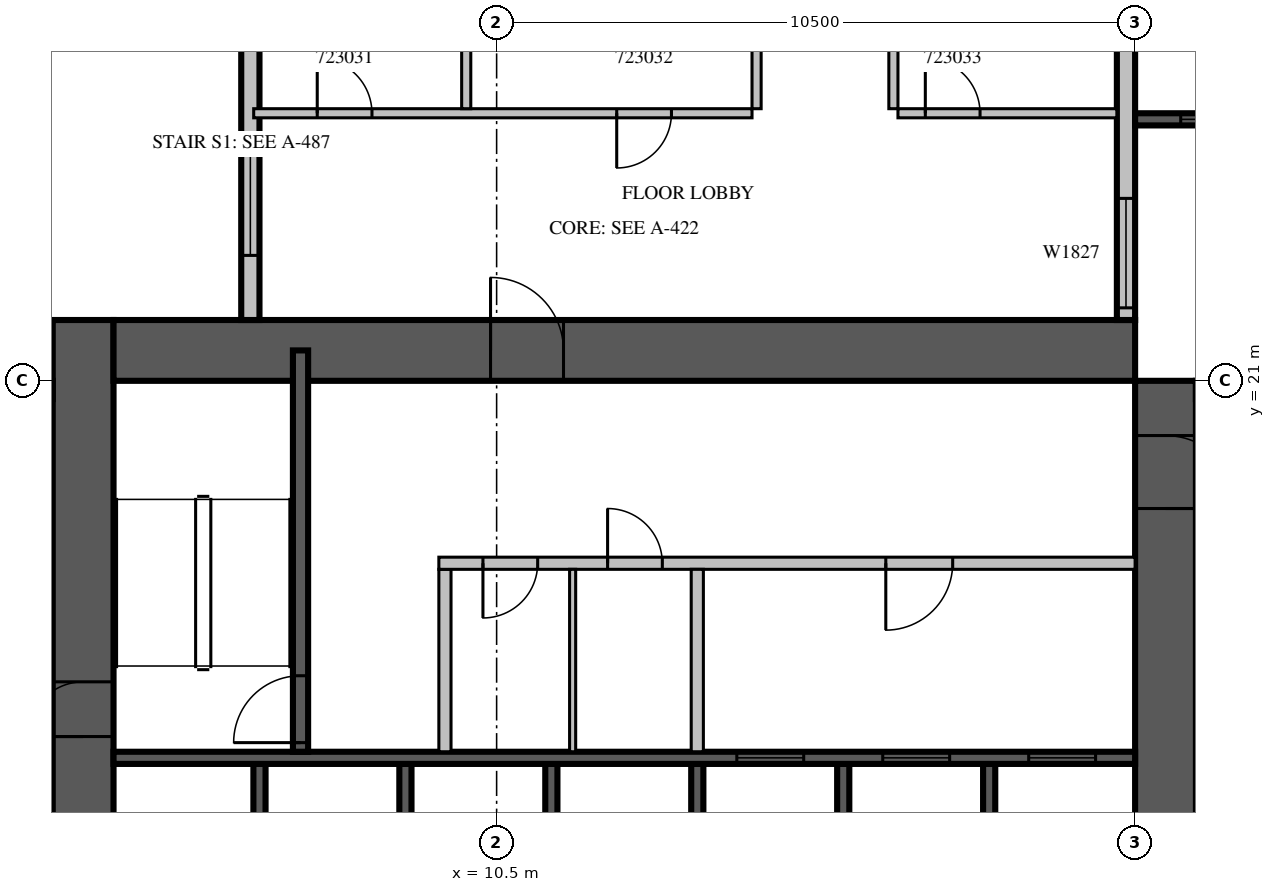
"""IFC4 building model, lengths in metres.
Left out: names, types, materials, properties, quantities, classifications, styles, units other than length and angle.
Written with IfcOpenShell. Run it as: python <this file> out.ifc"""

import sys

from ifc_helpers import new_model, si_unit, direction, frame, frame_2d, origin, place, context, subcontext, project, spatial, rectangle, extrude, source, transform, mapped, element, fill, save


model = new_model("IFC4")
c1 = context("Model", 3, precision=1e-05, world=origin(), true_north=direction((0.0, 1.0)))
c2 = subcontext(c1, "Body", "Model", "MODEL_VIEW")
j1 = project(units=[si_unit("LENGTHUNIT", "METRE"), si_unit("PLANEANGLEUNIT", "RADIAN")], contexts=[c1])
p1 = place(None, origin())
s1 = spatial("IfcSite", under=j1, at=p1, CompositionType="ELEMENT")
p2 = place(p1, origin())
s2 = spatial("IfcBuilding", under=s1, at=p2, CompositionType="ELEMENT")
p3 = place(p2, frame((0.0, 0.0, 107.7)))
s3 = spatial("IfcBuildingStorey", under=s2, at=p3, CompositionType="ELEMENT", Elevation=107.7)
m1 = source(origin(), c2, "Body", "SweptSolid", [
    extrude(rectangle(XDim=17.8, YDim=1.0, at=frame_2d((8.9, 0.0))), origin(), (0.0, 0.0, 1.0), 4.2),
])
p4 = place(p3, frame((3.7, 4.2, 0.0), z_axis=(0.0, 0.0, 1.0), x_axis=(0.0, 1.0, 0.0)))
e1 = element("IfcWall", 1, at=p4, inside=s3, PredefinedType="SHEAR", context=c2, shape_type="MappedRepresentation", body=[
    mapped(m1, transform((0.0, 0.0, 0.0), scale=1.0)),
])
m2 = source(origin(), c2, "Body", "SweptSolid", [
    extrude(rectangle(XDim=2.2, YDim=2.1, at=frame_2d((1.1, 1.05))), frame((0.0, 0.51, 0.0), z_axis=(0.0, -1.0, 0.0), x_axis=(1.0, 0.0, 0.0)), (0.0, 0.0, 1.0), 1.02),
])
p5 = place(p4, frame((4.2, 0.0, 0.0)))
e2 = element("IfcOpeningElement", 2, at=p5, cuts=e1, PredefinedType="OPENING", context=c2, shape_type="MappedRepresentation", body=[
    mapped(m2, transform((0.0, 0.0, 0.0), scale=1.0)),
])
m3 = source(origin(), c2, "Body", "SweptSolid", [
    extrude(rectangle(XDim=0.9, YDim=2.1, at=frame_2d((0.45, 1.05))), frame((0.0, 0.51, 0.0), z_axis=(0.0, -1.0, 0.0), x_axis=(1.0, 0.0, 0.0)), (0.0, 0.0, 1.0), 1.02),
])
p6 = place(p4, frame((10.95, 0.0, 0.0)))
e3 = element("IfcOpeningElement", 3, at=p6, cuts=e1, PredefinedType="OPENING", context=c2, shape_type="MappedRepresentation", body=[
    mapped(m3, transform((0.0, 0.0, 0.0), scale=1.0)),
])
m4 = source(origin(), c2, "Body", "SweptSolid", [
    extrude(rectangle(XDim=16.8, YDim=1.0, at=frame_2d((8.4, 0.0))), origin(), (0.0, 0.0, 1.0), 4.2),
])
p7 = place(p3, frame((21.5, 4.2, 0.0), z_axis=(0.0, 0.0, 1.0), x_axis=(0.0, 1.0, 0.0)))
e4 = element("IfcWall", 4, at=p7, inside=s3, PredefinedType="SHEAR", context=c2, shape_type="MappedRepresentation", body=[
    mapped(m4, transform((0.0, 0.0, 0.0), scale=1.0)),
])
p8 = place(p7, frame((4.2, 0.0, 0.0)))
e5 = element("IfcOpeningElement", 5, at=p8, cuts=e4, PredefinedType="OPENING", context=c2, shape_type="MappedRepresentation", body=[
    mapped(m2, transform((0.0, 0.0, 0.0), scale=1.0)),
])
m5 = source(origin(), c2, "Body", "SweptSolid", [
    extrude(rectangle(XDim=1.2, YDim=2.1, at=frame_2d((0.6, 1.05))), frame((0.0, 0.51, 0.0), z_axis=(0.0, -1.0, 0.0), x_axis=(1.0, 0.0, 0.0)), (0.0, 0.0, 1.0), 1.02),
])
p9 = place(p7, frame((14.7, 0.0, 0.0)))
e6 = element("IfcOpeningElement", 6, at=p9, cuts=e4, PredefinedType="OPENING", context=c2, shape_type="MappedRepresentation", body=[
    mapped(m5, transform((0.0, 0.0, 0.0), scale=1.0)),
])
p10 = place(p3, frame((4.2, 21.5, 0.0), z_axis=(0.0, 0.0, 1.0), x_axis=(1.0, 0.0, 0.0)))
e7 = element("IfcWall", 7, at=p10, inside=s3, PredefinedType="SHEAR", context=c2, shape_type="MappedRepresentation", body=[
    mapped(m4, transform((0.0, 0.0, 0.0), scale=1.0)),
])
p11 = place(p10, frame((6.2, 0.0, 0.0)))
e8 = element("IfcOpeningElement", 8, at=p11, cuts=e7, PredefinedType="OPENING", context=c2, shape_type="MappedRepresentation", body=[
    mapped(m5, transform((0.0, 0.0, 0.0), scale=1.0)),
])
m6 = source(origin(), c2, "Body", "SweptSolid", [
    extrude(rectangle(XDim=6.875, YDim=0.3, at=frame_2d((3.438, 0.0))), origin(), (0.0, 0.0, 1.0), 3.8),
])
p12 = place(p3, frame((20.85, 22.0, 0.0), z_axis=(0.0, 0.0, 1.0), x_axis=(0.0, 1.0, 0.0)))
e9 = element("IfcWall", 9, at=p12, inside=s3, PredefinedType="STANDARD", context=c2, shape_type="MappedRepresentation", body=[
    mapped(m6, transform((0.0, 0.0, 0.0), scale=1.0)),
])
m7 = source(origin(), c2, "Body", "SweptSolid", [
    extrude(rectangle(XDim=1.8, YDim=2.7, at=frame_2d((0.9, 1.35))), frame((0.0, 0.16, 0.0), z_axis=(0.0, -1.0, 0.0), x_axis=(1.0, 0.0, 0.0)), (0.0, 0.0, 1.0), 0.32),
])
p13 = place(p12, frame((0.2, 0.0, 0.6)))
e10 = element("IfcOpeningElement", 10, at=p13, cuts=e9, PredefinedType="OPENING", context=c2, shape_type="MappedRepresentation", body=[
    mapped(m7, transform((0.0, 0.0, 0.0), scale=1.0)),
])
m8 = source(origin(), c2, "Body", "SweptSolid", [
    extrude(rectangle(XDim=1.0, YDim=2.1, at=frame_2d((0.5, 1.05))), frame((0.0, 0.16, 0.0), z_axis=(0.0, -1.0, 0.0), x_axis=(1.0, 0.0, 0.0)), (0.0, 0.0, 1.0), 0.32),
])
p14 = place(p12, frame((4.8, 0.0, 0.0)))
e11 = element("IfcOpeningElement", 11, at=p14, cuts=e9, PredefinedType="OPENING", context=c2, shape_type="MappedRepresentation", body=[
    mapped(m8, transform((0.0, 0.0, 0.0), scale=1.0)),
])
p15 = place(p3, frame((6.45, 38.4, 0.0), z_axis=(0.0, 0.0, 1.0), x_axis=(0.0, -1.0, 0.0)))
e12 = element("IfcWall", 12, at=p15, inside=s3, PredefinedType="STANDARD", context=c2, shape_type="SweptSolid", body=[
    extrude(rectangle(XDim=16.4, YDim=0.3, at=frame_2d((8.2, 0.0))), origin(), (0.0, 0.0, 1.0), 3.8),
])
p16 = place(p15, frame((1.15, 0.0, 0.6)))
e13 = element("IfcOpeningElement", 13, at=p16, cuts=e12, PredefinedType="OPENING", context=c2, shape_type="MappedRepresentation", body=[
    mapped(m7, transform((0.0, 0.0, 0.0), scale=1.0)),
])
p17 = place(p15, frame((9.438, 0.0, 0.6)))
e14 = element("IfcOpeningElement", 14, at=p17, cuts=e12, PredefinedType="OPENING", context=c2, shape_type="MappedRepresentation", body=[
    mapped(m7, transform((0.0, 0.0, 0.0), scale=1.0)),
])
p18 = place(p15, frame((13.537, 0.0, 0.6)))
e15 = element("IfcOpeningElement", 15, at=p18, cuts=e12, PredefinedType="OPENING", context=c2, shape_type="MappedRepresentation", body=[
    mapped(m7, transform((0.0, 0.0, 0.0), scale=1.0)),
])
p19 = place(p15, frame((5.908, 0.0, 0.0)))
e16 = element("IfcOpeningElement", 16, at=p19, cuts=e12, PredefinedType="OPENING", context=c2, shape_type="MappedRepresentation", body=[
    mapped(m8, transform((0.0, 0.0, 0.0), scale=1.0)),
])
m9 = source(origin(), c2, "Body", "SweptSolid", [
    extrude(rectangle(XDim=3.9, YDim=0.2, at=frame_2d((1.95, 0.0))), origin(), (0.0, 0.0, 1.0), 3.79),
])
p20 = place(p3, frame((21.0, 25.3, 0.0), z_axis=(0.0, 0.0, 1.0), x_axis=(1.0, 0.0, 0.0)))
e17 = element("IfcWall", 17, at=p20, inside=s3, PredefinedType="SOLIDWALL", context=c2, shape_type="MappedRepresentation", body=[
    mapped(m9, transform((0.0, 0.0, 0.0), scale=1.0)),
])
m10 = source(origin(), c2, "Body", "SweptSolid", [
    extrude(rectangle(XDim=2.4, YDim=2.7, at=frame_2d((1.2, 1.35))), frame((0.0, 0.11, 0.0), z_axis=(0.0, -1.0, 0.0), x_axis=(1.0, 0.0, 0.0)), (0.0, 0.0, 1.0), 0.22),
])
p21 = place(p20, frame((0.75, 0.0, 0.6)))
e18 = element("IfcOpeningElement", 18, at=p21, cuts=e17, PredefinedType="OPENING", context=c2, shape_type="MappedRepresentation", body=[
    mapped(m10, transform((0.0, 0.0, 0.0), scale=1.0)),
])
m11 = source(origin(), c2, "Body", "SweptSolid", [
    extrude(rectangle(XDim=3.0, YDim=0.2, at=frame_2d((1.5, 0.0))), origin(), (0.0, 0.0, 1.0), 4.2),
])
for number, where, z_axis, x_axis in (
    (19, (6.6, 11.7, 0.0), (0.0, 0.0, 1.0), (0.0, 1.0, 0.0)),
    (20, (9.0, 11.7, 0.0), (0.0, 0.0, 1.0), (0.0, 1.0, 0.0)),
    (21, (11.4, 11.7, 0.0), (0.0, 0.0, 1.0), (0.0, 1.0, 0.0)),
    (22, (13.8, 11.7, 0.0), (0.0, 0.0, 1.0), (0.0, 1.0, 0.0)),
    (23, (16.2, 11.7, 0.0), (0.0, 0.0, 1.0), (0.0, 1.0, 0.0)),
    (24, (18.6, 11.7, 0.0), (0.0, 0.0, 1.0), (0.0, 1.0, 0.0)),
):
    element("IfcWall", number, at=place(p3, frame(where, z_axis=z_axis, x_axis=x_axis)), inside=s3, PredefinedType="SOLIDWALL", context=c2, shape_type="MappedRepresentation", body=[
        mapped(m11, transform((0.0, 0.0, 0.0), scale=1.0)),
    ])
m12 = source(origin(), c2, "Body", "SweptSolid", [
    extrude(rectangle(XDim=16.8, YDim=0.2, at=frame_2d((8.4, 0.0))), origin(), (0.0, 0.0, 1.0), 4.2),
])
p22 = place(p3, frame((4.2, 14.8, 0.0), z_axis=(0.0, 0.0, 1.0), x_axis=(1.0, 0.0, 0.0)))
e25 = element("IfcWall", 25, at=p22, inside=s3, PredefinedType="SOLIDWALL", context=c2, shape_type="MappedRepresentation", body=[
    mapped(m12, transform((0.0, 0.0, 0.0), scale=1.0)),
])
m13 = source(origin(), c2, "Body", "SweptSolid", [
    extrude(rectangle(XDim=1.1, YDim=2.1, at=frame_2d((0.55, 1.05))), frame((0.0, 0.11, 0.0), z_axis=(0.0, -1.0, 0.0), x_axis=(1.0, 0.0, 0.0)), (0.0, 0.0, 1.0), 0.22),
])
p23 = place(p22, frame((10.25, 0.0, 0.0)))
e26 = element("IfcOpeningElement", 26, at=p23, cuts=e25, PredefinedType="OPENING", context=c2, shape_type="MappedRepresentation", body=[
    mapped(m13, transform((0.0, 0.0, 0.0), scale=1.0)),
])
p24 = place(p22, frame((12.65, 0.0, 0.0)))
e27 = element("IfcOpeningElement", 27, at=p24, cuts=e25, PredefinedType="OPENING", context=c2, shape_type="MappedRepresentation", body=[
    mapped(m13, transform((0.0, 0.0, 0.0), scale=1.0)),
])
p25 = place(p22, frame((15.05, 0.0, 0.0)))
e28 = element("IfcOpeningElement", 28, at=p25, cuts=e25, PredefinedType="OPENING", context=c2, shape_type="MappedRepresentation", body=[
    mapped(m13, transform((0.0, 0.0, 0.0), scale=1.0)),
])
m14 = source(origin(), c2, "Body", "SweptSolid", [
    extrude(rectangle(XDim=6.6, YDim=0.25, at=frame_2d((3.3, 0.0))), origin(), (0.0, 0.0, 1.0), 3.8),
])
p26 = place(p3, frame((7.275, 14.9, 0.0), z_axis=(0.0, 0.0, 1.0), x_axis=(0.0, 1.0, 0.0)))
e29 = element("IfcWall", 29, at=p26, inside=s3, PredefinedType="SOLIDWALL", context=c2, shape_type="MappedRepresentation", body=[
    mapped(m14, transform((0.0, 0.0, 0.0), scale=1.0)),
])
m15 = source(origin(), c2, "Body", "SweptSolid", [
    extrude(rectangle(XDim=1.1, YDim=2.1, at=frame_2d((0.55, 1.05))), frame((0.0, 0.135, 0.0), z_axis=(0.0, -1.0, 0.0), x_axis=(1.0, 0.0, 0.0)), (0.0, 0.0, 1.0), 0.27),
])
p27 = place(p26, frame((0.15, 0.0, 0.0)))
e30 = element("IfcOpeningElement", 30, at=p27, cuts=e29, PredefinedType="OPENING", context=c2, shape_type="MappedRepresentation", body=[
    mapped(m15, transform((0.0, 0.0, 0.0), scale=1.0)),
])
m16 = source(origin(), c2, "Body", "SweptSolid", [
    extrude(rectangle(XDim=3.0, YDim=0.2, at=frame_2d((1.5, 0.0))), origin(), (0.0, 0.0, 1.0), 3.8),
])
p28 = place(p3, frame((9.65, 14.9, 0.0), z_axis=(0.0, 0.0, 1.0), x_axis=(0.0, 1.0, 0.0)))
e31 = element("IfcWall", 31, at=p28, inside=s3, PredefinedType="PARTITIONING", context=c2, shape_type="MappedRepresentation", body=[
    mapped(m16, transform((0.0, 0.0, 0.0), scale=1.0)),
])
m17 = source(origin(), c2, "Body", "SweptSolid", [
    extrude(rectangle(XDim=11.45, YDim=0.2, at=frame_2d((5.725, 0.0))), origin(), (0.0, 0.0, 1.0), 3.8),
])
p29 = place(p3, frame((9.55, 18.0, 0.0), z_axis=(0.0, 0.0, 1.0), x_axis=(1.0, 0.0, 0.0)))
e32 = element("IfcWall", 32, at=p29, inside=s3, PredefinedType="PARTITIONING", context=c2, shape_type="MappedRepresentation", body=[
    mapped(m17, transform((0.0, 0.0, 0.0), scale=1.0)),
])
m18 = source(origin(), c2, "Body", "SweptSolid", [
    extrude(rectangle(XDim=0.9, YDim=2.1, at=frame_2d((0.45, 1.05))), frame((0.0, 0.11, 0.0), z_axis=(0.0, -1.0, 0.0), x_axis=(1.0, 0.0, 0.0)), (0.0, 0.0, 1.0), 0.22),
])
p30 = place(p29, frame((0.725, 0.0, 0.0)))
e33 = element("IfcOpeningElement", 33, at=p30, cuts=e32, PredefinedType="OPENING", context=c2, shape_type="MappedRepresentation", body=[
    mapped(m18, transform((0.0, 0.0, 0.0), scale=1.0)),
])
p31 = place(p29, frame((2.775, 0.0, 0.0)))
e34 = element("IfcOpeningElement", 34, at=p31, cuts=e32, PredefinedType="OPENING", context=c2, shape_type="MappedRepresentation", body=[
    mapped(m18, transform((0.0, 0.0, 0.0), scale=1.0)),
])
p32 = place(p29, frame((7.35, 0.0, 0.0)))
e35 = element("IfcOpeningElement", 35, at=p32, cuts=e32, PredefinedType="OPENING", context=c2, shape_type="MappedRepresentation", body=[
    mapped(m13, transform((0.0, 0.0, 0.0), scale=1.0)),
])
p33 = place(p3, frame((13.8, 14.9, 0.0), z_axis=(0.0, 0.0, 1.0), x_axis=(0.0, 1.0, 0.0)))
e36 = element("IfcWall", 36, at=p33, inside=s3, PredefinedType="PARTITIONING", context=c2, shape_type="MappedRepresentation", body=[
    mapped(m16, transform((0.0, 0.0, 0.0), scale=1.0)),
])
m19 = source(origin(), c2, "Body", "SweptSolid", [
    extrude(rectangle(XDim=3.0, YDim=0.1, at=frame_2d((1.5, 0.0))), origin(), (0.0, 0.0, 1.0), 3.8),
])
p34 = place(p3, frame((11.75, 14.9, 0.0), z_axis=(0.0, 0.0, 1.0), x_axis=(0.0, 1.0, 0.0)))
e37 = element("IfcWall", 37, at=p34, inside=s3, PredefinedType="PARTITIONING", context=c2, shape_type="MappedRepresentation", body=[
    mapped(m19, transform((0.0, 0.0, 0.0), scale=1.0)),
])
p35 = place(p3, frame((6.505, 25.4, 0.0), z_axis=(0.0, 0.0, 1.0), x_axis=(1.0, 0.0, 0.0)))
e38 = element("IfcWall", 38, at=p35, inside=s3, PredefinedType="PARTITIONING", context=c2, shape_type="SweptSolid", body=[
    extrude(rectangle(XDim=8.195, YDim=0.15, at=frame_2d((4.098, 0.0))), origin(), (0.0, 0.0, 1.0), 3.8),
])
m20 = source(origin(), c2, "Body", "SweptSolid", [
    extrude(rectangle(XDim=0.9, YDim=2.1, at=frame_2d((0.45, 1.05))), frame((0.0, 0.085, 0.0), z_axis=(0.0, -1.0, 0.0), x_axis=(1.0, 0.0, 0.0)), (0.0, 0.0, 1.0), 0.17),
])
p36 = place(p35, frame((1.045, 0.0, 0.0)))
e39 = element("IfcOpeningElement", 39, at=p36, cuts=e38, PredefinedType="OPENING", context=c2, shape_type="MappedRepresentation", body=[
    mapped(m20, transform((0.0, 0.0, 0.0), scale=1.0)),
])
p37 = place(p35, frame((5.97, 0.0, 0.0)))
e40 = element("IfcOpeningElement", 40, at=p37, cuts=e38, PredefinedType="OPENING", context=c2, shape_type="MappedRepresentation", body=[
    mapped(m20, transform((0.0, 0.0, 0.0), scale=1.0)),
])
m21 = source(origin(), c2, "Body", "SweptSolid", [
    extrude(rectangle(XDim=3.6, YDim=0.15, at=frame_2d((1.8, 0.0))), origin(), (0.0, 0.0, 1.0), 3.8),
])
p38 = place(p3, frame((17.1, 25.4, 0.0), z_axis=(0.0, 0.0, 1.0), x_axis=(1.0, 0.0, 0.0)))
e41 = element("IfcWall", 41, at=p38, inside=s3, PredefinedType="PARTITIONING", context=c2, shape_type="MappedRepresentation", body=[
    mapped(m21, transform((0.0, 0.0, 0.0), scale=1.0)),
])
p39 = place(p38, frame((0.45, 0.0, 0.0)))
e42 = element("IfcOpeningElement", 42, at=p39, cuts=e41, PredefinedType="OPENING", context=c2, shape_type="MappedRepresentation", body=[
    mapped(m20, transform((0.0, 0.0, 0.0), scale=1.0)),
])
p40 = place(p3, frame((10.0, 25.475, 0.0), z_axis=(0.0, 0.0, 1.0), x_axis=(0.0, 1.0, 0.0)))
e43 = element("IfcWall", 43, at=p40, inside=s3, PredefinedType="PARTITIONING", context=c2, shape_type="SweptSolid", body=[
    extrude(rectangle(XDim=3.401, YDim=0.15, at=frame_2d((1.7, 0.0))), origin(), (0.0, 0.0, 1.0), 3.8),
])
m22 = source(origin(), c2, "Body", "SweptSolid", [
    extrude(rectangle(XDim=3.85, YDim=0.15, at=frame_2d((1.925, 0.0))), origin(), (0.0, 0.0, 1.0), 3.8),
])
for number, where, z_axis, x_axis in (
    (44, (14.775, 25.475, 0.0), (0.0, 0.0, 1.0), (0.0, 1.0, 0.0)),
    (45, (17.025, 29.325, 0.0), (0.0, 0.0, 1.0), (0.0, -1.0, 0.0)),
):
    element("IfcWall", number, at=place(p3, frame(where, z_axis=z_axis, x_axis=x_axis)), inside=s3, PredefinedType="PARTITIONING", context=c2, shape_type="MappedRepresentation", body=[
        mapped(m22, transform((0.0, 0.0, 0.0), scale=1.0)),
    ])
m23 = source(origin(), c2, "Body", "SweptSolid", [
    extrude(rectangle(XDim=1.8, YDim=2.7, at=frame_2d((0.9, 1.35))), frame((0.0, 0.03, 0.0), z_axis=(0.0, -1.0, 0.0), x_axis=(1.0, 0.0, 0.0)), (0.0, 0.0, 1.0), 0.06),
])
p41 = place(p13, origin())
e46 = element("IfcWindow", 46, at=p41, inside=s3, PartitioningType="SINGLE_PANEL", PredefinedType="WINDOW", context=c2, shape_type="MappedRepresentation", body=[
    mapped(m23, transform((0.0, 0.0, 0.0), scale=1.0)),
])
fill(e10, e46)
p42 = place(p18, origin())
e47 = element("IfcWindow", 47, at=p42, inside=s3, PartitioningType="SINGLE_PANEL", PredefinedType="WINDOW", context=c2, shape_type="MappedRepresentation", body=[
    mapped(m23, transform((0.0, 0.0, 0.0), scale=1.0)),
])
fill(e15, e47)
m24 = source(origin(), c2, "Body", "SweptSolid", [
    extrude(rectangle(XDim=2.4, YDim=2.7, at=frame_2d((1.2, 1.35))), frame((0.0, 0.03, 0.0), z_axis=(0.0, -1.0, 0.0), x_axis=(1.0, 0.0, 0.0)), (0.0, 0.0, 1.0), 0.06),
])
p43 = place(p21, origin())
e48 = element("IfcWindow", 48, at=p43, inside=s3, PartitioningType="SINGLE_PANEL", PredefinedType="WINDOW", context=c2, shape_type="MappedRepresentation", body=[
    mapped(m24, transform((0.0, 0.0, 0.0), scale=1.0)),
])
fill(e18, e48)
m25 = source(origin(), c2, "Body", "SweptSolid", [
    extrude(rectangle(XDim=1.1, YDim=2.1, at=frame_2d((0.55, 1.05))), frame((0.0, 0.025, 0.0), z_axis=(0.0, -1.0, 0.0), x_axis=(1.0, 0.0, 0.0)), (0.0, 0.0, 1.0), 0.05),
])
p44 = place(p23, origin())
e49 = element("IfcDoor", 49, at=p44, inside=s3, OperationType="SLIDING_TO_LEFT", PredefinedType="DOOR", context=c2, shape_type="MappedRepresentation", body=[
    mapped(m25, transform((0.0, 0.0, 0.0), scale=1.0)),
])
fill(e26, e49)
p45 = place(p24, origin())
e50 = element("IfcDoor", 50, at=p45, inside=s3, OperationType="SLIDING_TO_LEFT", PredefinedType="DOOR", context=c2, shape_type="MappedRepresentation", body=[
    mapped(m25, transform((0.0, 0.0, 0.0), scale=1.0)),
])
fill(e27, e50)
p46 = place(p25, origin())
e51 = element("IfcDoor", 51, at=p46, inside=s3, OperationType="SLIDING_TO_LEFT", PredefinedType="DOOR", context=c2, shape_type="MappedRepresentation", body=[
    mapped(m25, transform((0.0, 0.0, 0.0), scale=1.0)),
])
fill(e28, e51)
p47 = place(p27, origin())
e52 = element("IfcDoor", 52, at=p47, inside=s3, OperationType="SINGLE_SWING_LEFT", PredefinedType="DOOR", context=c2, shape_type="MappedRepresentation", body=[
    mapped(m25, transform((0.0, 0.0, 0.0), scale=1.0)),
])
fill(e30, e52)
m26 = source(origin(), c2, "Body", "SweptSolid", [
    extrude(rectangle(XDim=0.9, YDim=2.1, at=frame_2d((0.45, 1.05))), frame((0.0, 0.025, 0.0), z_axis=(0.0, -1.0, 0.0), x_axis=(1.0, 0.0, 0.0)), (0.0, 0.0, 1.0), 0.05),
])
p48 = place(p30, origin())
e53 = element("IfcDoor", 53, at=p48, inside=s3, OperationType="SINGLE_SWING_RIGHT", PredefinedType="DOOR", context=c2, shape_type="MappedRepresentation", body=[
    mapped(m26, transform((0.0, 0.0, 0.0), scale=1.0)),
])
fill(e33, e53)
p49 = place(p31, origin())
e54 = element("IfcDoor", 54, at=p49, inside=s3, OperationType="SINGLE_SWING_LEFT", PredefinedType="DOOR", context=c2, shape_type="MappedRepresentation", body=[
    mapped(m26, transform((0.0, 0.0, 0.0), scale=1.0)),
])
fill(e34, e54)
p50 = place(p32, origin())
e55 = element("IfcDoor", 55, at=p50, inside=s3, OperationType="SINGLE_SWING_RIGHT", PredefinedType="DOOR", context=c2, shape_type="MappedRepresentation", body=[
    mapped(m25, transform((0.0, 0.0, 0.0), scale=1.0)),
])
fill(e35, e55)
m27 = source(origin(), c2, "Body", "SweptSolid", [
    extrude(rectangle(XDim=1.2, YDim=2.1, at=frame_2d((0.6, 1.05))), frame((0.0, 0.025, 0.0), z_axis=(0.0, -1.0, 0.0), x_axis=(1.0, 0.0, 0.0)), (0.0, 0.0, 1.0), 0.05),
])
p51 = place(p11, origin())
e56 = element("IfcDoor", 56, at=p51, inside=s3, OperationType="SINGLE_SWING_LEFT", PredefinedType="DOOR", context=c2, shape_type="MappedRepresentation", body=[
    mapped(m27, transform((0.0, 0.0, 0.0), scale=1.0)),
])
fill(e8, e56)
p52 = place(p9, origin())
e57 = element("IfcDoor", 57, at=p52, inside=s3, OperationType="SINGLE_SWING_RIGHT", PredefinedType="DOOR", context=c2, shape_type="MappedRepresentation", body=[
    mapped(m27, transform((0.0, 0.0, 0.0), scale=1.0)),
])
fill(e6, e57)
p53 = place(p6, origin())
e58 = element("IfcDoor", 58, at=p53, inside=s3, OperationType="SINGLE_SWING_LEFT", PredefinedType="DOOR", context=c2, shape_type="MappedRepresentation", body=[
    mapped(m26, transform((0.0, 0.0, 0.0), scale=1.0)),
])
fill(e3, e58)
p54 = place(p36, origin())
e59 = element("IfcDoor", 59, at=p54, inside=s3, OperationType="SINGLE_SWING_LEFT", PredefinedType="DOOR", context=c2, shape_type="MappedRepresentation", body=[
    mapped(m26, transform((0.0, 0.0, 0.0), scale=1.0)),
])
fill(e39, e59)
p55 = place(p37, origin())
e60 = element("IfcDoor", 60, at=p55, inside=s3, OperationType="SINGLE_SWING_RIGHT", PredefinedType="DOOR", context=c2, shape_type="MappedRepresentation", body=[
    mapped(m26, transform((0.0, 0.0, 0.0), scale=1.0)),
])
fill(e40, e60)
p56 = place(p39, origin())
e61 = element("IfcDoor", 61, at=p56, inside=s3, OperationType="SINGLE_SWING_LEFT", PredefinedType="DOOR", context=c2, shape_type="MappedRepresentation", body=[
    mapped(m26, transform((0.0, 0.0, 0.0), scale=1.0)),
])
fill(e42, e61)
save(model, sys.argv[1])
